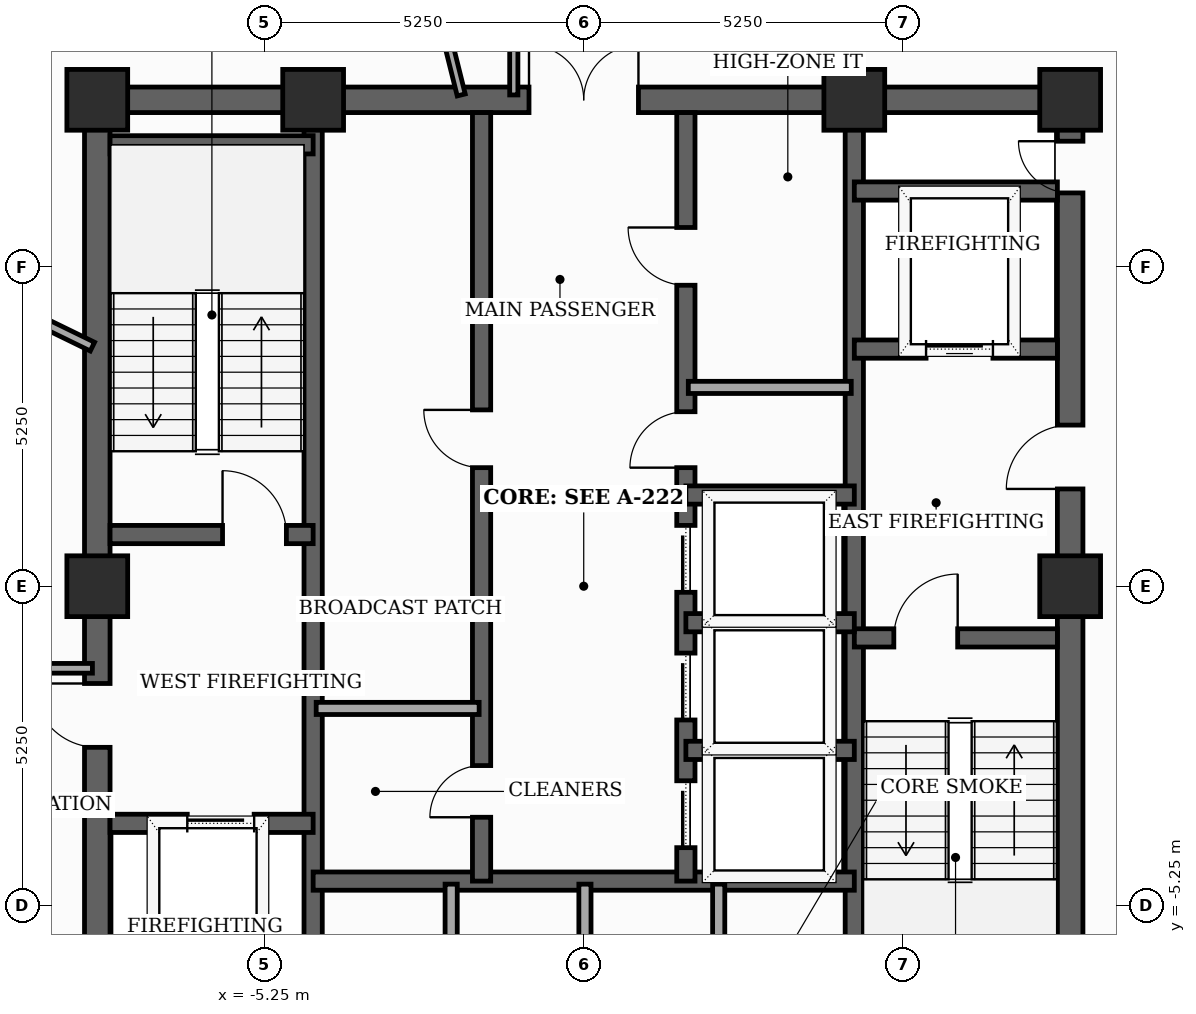
"""IFC4 building model, lengths in metres.
Left out: names, types, materials, properties, quantities, classifications, styles, units other than length and angle.
Written with IfcOpenShell. Run it as: python <this file> out.ifc"""

import sys

from ifc_helpers import new_model, si_unit, direction, frame, frame_2d, origin, origin_2d, place, context, subcontext, project, spatial, rectangle, extrude, element, fill, save


model = new_model("IFC4")
c1 = context("Model", 3, precision=1e-05, world=origin(), true_north=direction((0.0, 1.0)))
c2 = subcontext(c1, "Body", "Model", "MODEL_VIEW")
j1 = project(units=[si_unit("LENGTHUNIT", "METRE"), si_unit("PLANEANGLEUNIT", "RADIAN")], contexts=[c1])
p1 = place(None, origin())
s1 = spatial("IfcSite", under=j1, at=p1, CompositionType="ELEMENT")
p2 = place(p1, origin())
s2 = spatial("IfcBuilding", under=s1, at=p2, CompositionType="ELEMENT")
p3 = place(p2, frame((0.0, 0.0, 305.4)))
s3 = spatial("IfcBuildingStorey", under=s2, at=p3, CompositionType="ELEMENT", Elevation=305.4)
for number, where, z_axis, x_axis in (
    (1, (8.0, 0.0, 0.0), (0.0, 0.0, 1.0), (1.0, 0.0, 0.0)),
    (2, (8.0, 8.0, 0.0), (0.0, 0.0, 1.0), (1.0, 0.0, 0.0)),
    (3, (4.45, 8.0, 0.0), (0.0, 0.0, 1.0), (1.0, 0.0, 0.0)),
    (4, (-4.45, 8.0, 0.0), (0.0, 0.0, 1.0), (1.0, 0.0, 0.0)),
    (5, (-8.0, 8.0, 0.0), (0.0, 0.0, 1.0), (1.0, 0.0, 0.0)),
    (6, (-8.0, 0.0, 0.0), (0.0, 0.0, 1.0), (1.0, 0.0, 0.0)),
):
    element("IfcColumn", number, at=place(p3, frame(where, z_axis=z_axis, x_axis=x_axis)), inside=s3, PredefinedType="COLUMN", context=c2, shape_type="SweptSolid", body=[
        extrude(rectangle(XDim=1.0, YDim=1.0, at=origin_2d()), origin(), (0.0, 0.0, 1.0), 3.7),
    ])
p4 = place(p3, frame((-8.0, -8.0, 0.0), z_axis=(0.0, 0.0, 1.0), x_axis=(0.0, 1.0, 0.0)))
e7 = element("IfcWall", 7, at=p4, inside=s3, PredefinedType="SHEAR", context=c2, shape_type="SweptSolid", body=[
    extrude(rectangle(XDim=16.0, YDim=0.42, at=frame_2d((8.0, 0.0))), origin(), (0.0, 0.0, 1.0), 3.5),
])
p5 = place(p4, frame((0.681, 0.0, 0.0)))
e8 = element("IfcOpeningElement", 8, at=p5, cuts=e7, PredefinedType="OPENING", context=c2, shape_type="SweptSolid", body=[
    extrude(rectangle(XDim=0.85, YDim=2.02, at=frame_2d((0.425, 1.01))), frame((0.0, 0.22, 0.0), z_axis=(0.0, -1.0, 0.0), x_axis=(1.0, 0.0, 0.0)), (0.0, 0.0, 1.0), 0.44),
])
p6 = place(p4, frame((5.35, 0.0, 0.0)))
e9 = element("IfcOpeningElement", 9, at=p6, cuts=e7, PredefinedType="OPENING", context=c2, shape_type="SweptSolid", body=[
    extrude(rectangle(XDim=1.05, YDim=2.15, at=frame_2d((0.525, 1.075))), frame((0.0, 0.22, 0.0), z_axis=(0.0, -1.0, 0.0), x_axis=(1.0, 0.0, 0.0)), (0.0, 0.0, 1.0), 0.44),
])
p7 = place(p3, frame((8.0, -8.0, 0.0), z_axis=(0.0, 0.0, 1.0), x_axis=(0.0, 1.0, 0.0)))
e10 = element("IfcWall", 10, at=p7, inside=s3, PredefinedType="SHEAR", context=c2, shape_type="SweptSolid", body=[
    extrude(rectangle(XDim=16.0, YDim=0.42, at=frame_2d((8.0, 0.0))), origin(), (0.0, 0.0, 1.0), 3.5),
])
p8 = place(p7, frame((9.6, 0.0, 0.0)))
e11 = element("IfcOpeningElement", 11, at=p8, cuts=e10, PredefinedType="OPENING", context=c2, shape_type="SweptSolid", body=[
    extrude(rectangle(XDim=1.05, YDim=2.15, at=frame_2d((0.525, 1.075))), frame((0.0, 0.22, 0.0), z_axis=(0.0, -1.0, 0.0), x_axis=(1.0, 0.0, 0.0)), (0.0, 0.0, 1.0), 0.44),
])
p9 = place(p7, frame((14.469, 0.0, 0.0)))
e12 = element("IfcOpeningElement", 12, at=p9, cuts=e10, PredefinedType="OPENING", context=c2, shape_type="SweptSolid", body=[
    extrude(rectangle(XDim=0.85, YDim=2.02, at=frame_2d((0.425, 1.01))), frame((0.0, 0.22, 0.0), z_axis=(0.0, -1.0, 0.0), x_axis=(1.0, 0.0, 0.0)), (0.0, 0.0, 1.0), 0.44),
])
p10 = place(p3, frame((-8.0, 8.0, 0.0), z_axis=(0.0, 0.0, 1.0), x_axis=(1.0, 0.0, 0.0)))
e13 = element("IfcWall", 13, at=p10, inside=s3, PredefinedType="SHEAR", context=c2, shape_type="SweptSolid", body=[
    extrude(rectangle(XDim=16.0, YDim=0.42, at=frame_2d((8.0, 0.0))), origin(), (0.0, 0.0, 1.0), 3.5),
])
p11 = place(p10, frame((7.1, 0.0, 0.0)))
e14 = element("IfcOpeningElement", 14, at=p11, cuts=e13, PredefinedType="OPENING", context=c2, shape_type="SweptSolid", body=[
    extrude(rectangle(XDim=1.8, YDim=2.15, at=frame_2d((0.9, 1.075))), frame((0.0, 0.22, 0.0), z_axis=(0.0, -1.0, 0.0), x_axis=(1.0, 0.0, 0.0)), (0.0, 0.0, 1.0), 0.44),
])
for number, where, z_axis, x_axis in (
    (15, (-4.45, -7.79, 0.0), (0.0, 0.0, 1.0), (0.0, 1.0, 0.0)),
    (16, (4.45, -7.79, 0.0), (0.0, 0.0, 1.0), (0.0, 1.0, 0.0)),
):
    element("IfcWall", number, at=place(p3, frame(where, z_axis=z_axis, x_axis=x_axis)), inside=s3, PredefinedType="SHEAR", context=c2, shape_type="SweptSolid", body=[
        extrude(rectangle(XDim=15.58, YDim=0.3, at=frame_2d((7.79, 0.0))), origin(), (0.0, 0.0, 1.0), 3.5),
    ])
p12 = place(p3, frame((-7.79, 0.85, 0.0), z_axis=(0.0, 0.0, 1.0), x_axis=(1.0, 0.0, 0.0)))
e17 = element("IfcWall", 17, at=p12, inside=s3, PredefinedType="SHEAR", context=c2, shape_type="SweptSolid", body=[
    extrude(rectangle(XDim=3.34, YDim=0.3, at=frame_2d((1.67, 0.0))), origin(), (0.0, 0.0, 1.0), 3.5),
])
p13 = place(p12, frame((1.85, 0.0, 0.0)))
e18 = element("IfcOpeningElement", 18, at=p13, cuts=e17, PredefinedType="OPENING", context=c2, shape_type="SweptSolid", body=[
    extrude(rectangle(XDim=1.05, YDim=2.15, at=frame_2d((0.525, 1.075))), frame((0.0, 0.16, 0.0), z_axis=(0.0, -1.0, 0.0), x_axis=(1.0, 0.0, 0.0)), (0.0, 0.0, 1.0), 0.32),
])
p14 = place(p3, frame((-7.79, 7.26, 0.0), z_axis=(0.0, 0.0, 1.0), x_axis=(1.0, 0.0, 0.0)))
e19 = element("IfcWall", 19, at=p14, inside=s3, PredefinedType="SHEAR", context=c2, shape_type="SweptSolid", body=[
    extrude(rectangle(XDim=3.34, YDim=0.3, at=frame_2d((1.67, 0.0))), origin(), (0.0, 0.0, 1.0), 3.5),
])
p15 = place(p3, frame((4.45, -0.85, 0.0), z_axis=(0.0, 0.0, 1.0), x_axis=(1.0, 0.0, 0.0)))
e20 = element("IfcWall", 20, at=p15, inside=s3, PredefinedType="SHEAR", context=c2, shape_type="SweptSolid", body=[
    extrude(rectangle(XDim=3.34, YDim=0.3, at=frame_2d((1.67, 0.0))), origin(), (0.0, 0.0, 1.0), 3.5),
])
p16 = place(p15, frame((0.65, 0.0, 0.0)))
e21 = element("IfcOpeningElement", 21, at=p16, cuts=e20, PredefinedType="OPENING", context=c2, shape_type="SweptSolid", body=[
    extrude(rectangle(XDim=1.05, YDim=2.15, at=frame_2d((0.525, 1.075))), frame((0.0, 0.16, 0.0), z_axis=(0.0, -1.0, 0.0), x_axis=(1.0, 0.0, 0.0)), (0.0, 0.0, 1.0), 0.32),
])
p17 = place(p3, frame((-7.79, -3.9, 0.0), z_axis=(0.0, 0.0, 1.0), x_axis=(1.0, 0.0, 0.0)))
e22 = element("IfcWall", 22, at=p17, inside=s3, PredefinedType="SHEAR", context=c2, shape_type="SweptSolid", body=[
    extrude(rectangle(XDim=3.34, YDim=0.3, at=frame_2d((1.67, 0.0))), origin(), (0.0, 0.0, 1.0), 3.5),
])
p18 = place(p17, frame((1.27, 0.0, 0.0)))
e23 = element("IfcOpeningElement", 23, at=p18, cuts=e22, PredefinedType="OPENING", context=c2, shape_type="SweptSolid", body=[
    extrude(rectangle(XDim=1.1, YDim=2.1, at=frame_2d((0.55, 1.05))), frame((0.0, 0.16, 0.0), z_axis=(0.0, -1.0, 0.0), x_axis=(1.0, 0.0, 0.0)), (0.0, 0.0, 1.0), 0.32),
])
p19 = place(p3, frame((4.45, 3.9, 0.0), z_axis=(0.0, 0.0, 1.0), x_axis=(1.0, 0.0, 0.0)))
e24 = element("IfcWall", 24, at=p19, inside=s3, PredefinedType="SHEAR", context=c2, shape_type="SweptSolid", body=[
    extrude(rectangle(XDim=3.34, YDim=0.3, at=frame_2d((1.67, 0.0))), origin(), (0.0, 0.0, 1.0), 3.5),
])
p20 = place(p19, frame((1.18, 0.0, 0.0)))
e25 = element("IfcOpeningElement", 25, at=p20, cuts=e24, PredefinedType="OPENING", context=c2, shape_type="SweptSolid", body=[
    extrude(rectangle(XDim=1.1, YDim=2.1, at=frame_2d((0.55, 1.05))), frame((0.0, 0.16, 0.0), z_axis=(0.0, -1.0, 0.0), x_axis=(1.0, 0.0, 0.0)), (0.0, 0.0, 1.0), 0.32),
])
p21 = place(p3, frame((4.45, 6.5, 0.0), z_axis=(0.0, 0.0, 1.0), x_axis=(1.0, 0.0, 0.0)))
e26 = element("IfcWall", 26, at=p21, inside=s3, PredefinedType="SHEAR", context=c2, shape_type="SweptSolid", body=[
    extrude(rectangle(XDim=3.34, YDim=0.3, at=frame_2d((1.67, 0.0))), origin(), (0.0, 0.0, 1.0), 3.5),
])
p22 = place(p3, frame((-4.45, -4.85, 0.0), z_axis=(0.0, 0.0, 1.0), x_axis=(1.0, 0.0, 0.0)))
e27 = element("IfcWall", 27, at=p22, inside=s3, PredefinedType="SHEAR", context=c2, shape_type="SweptSolid", body=[
    extrude(rectangle(XDim=8.9, YDim=0.3, at=frame_2d((4.45, 0.0))), origin(), (0.0, 0.0, 1.0), 3.5),
])
p23 = place(p3, frame((-1.68, -4.85, 0.0), z_axis=(0.0, 0.0, 1.0), x_axis=(0.0, 1.0, 0.0)))
e28 = element("IfcWall", 28, at=p23, inside=s3, PredefinedType="SHEAR", context=c2, shape_type="SweptSolid", body=[
    extrude(rectangle(XDim=12.64, YDim=0.3, at=frame_2d((6.32, 0.0))), origin(), (0.0, 0.0, 1.0), 3.5),
])
p24 = place(p23, frame((1.05, 0.0, 0.0)))
e29 = element("IfcOpeningElement", 29, at=p24, cuts=e28, PredefinedType="OPENING", context=c2, shape_type="SweptSolid", body=[
    extrude(rectangle(XDim=0.85, YDim=2.02, at=frame_2d((0.425, 1.01))), frame((0.0, 0.16, 0.0), z_axis=(0.0, -1.0, 0.0), x_axis=(1.0, 0.0, 0.0)), (0.0, 0.0, 1.0), 0.32),
])
p25 = place(p23, frame((6.8, 0.0, 0.0)))
e30 = element("IfcOpeningElement", 30, at=p25, cuts=e28, PredefinedType="OPENING", context=c2, shape_type="SweptSolid", body=[
    extrude(rectangle(XDim=0.95, YDim=2.1, at=frame_2d((0.475, 1.05))), frame((0.0, 0.16, 0.0), z_axis=(0.0, -1.0, 0.0), x_axis=(1.0, 0.0, 0.0)), (0.0, 0.0, 1.0), 0.32),
])
p26 = place(p3, frame((1.68, -4.85, 0.0), z_axis=(0.0, 0.0, 1.0), x_axis=(0.0, 1.0, 0.0)))
e31 = element("IfcWall", 31, at=p26, inside=s3, PredefinedType="SHEAR", context=c2, shape_type="SweptSolid", body=[
    extrude(rectangle(XDim=12.64, YDim=0.3, at=frame_2d((6.32, 0.0))), origin(), (0.0, 0.0, 1.0), 3.5),
])
p27 = place(p26, frame((0.55, 0.0, 0.0)))
e32 = element("IfcOpeningElement", 32, at=p27, cuts=e31, PredefinedType="OPENING", context=c2, shape_type="SweptSolid", body=[
    extrude(rectangle(XDim=1.1, YDim=2.1, at=frame_2d((0.55, 1.05))), frame((0.0, 0.16, 0.0), z_axis=(0.0, -1.0, 0.0), x_axis=(1.0, 0.0, 0.0)), (0.0, 0.0, 1.0), 0.32),
])
p28 = place(p26, frame((2.65, 0.0, 0.0)))
e33 = element("IfcOpeningElement", 33, at=p28, cuts=e31, PredefinedType="OPENING", context=c2, shape_type="SweptSolid", body=[
    extrude(rectangle(XDim=1.1, YDim=2.1, at=frame_2d((0.55, 1.05))), frame((0.0, 0.16, 0.0), z_axis=(0.0, -1.0, 0.0), x_axis=(1.0, 0.0, 0.0)), (0.0, 0.0, 1.0), 0.32),
])
p29 = place(p26, frame((4.75, 0.0, 0.0)))
e34 = element("IfcOpeningElement", 34, at=p29, cuts=e31, PredefinedType="OPENING", context=c2, shape_type="SweptSolid", body=[
    extrude(rectangle(XDim=1.1, YDim=2.1, at=frame_2d((0.55, 1.05))), frame((0.0, 0.16, 0.0), z_axis=(0.0, -1.0, 0.0), x_axis=(1.0, 0.0, 0.0)), (0.0, 0.0, 1.0), 0.32),
])
p30 = place(p26, frame((6.8, 0.0, 0.0)))
e35 = element("IfcOpeningElement", 35, at=p30, cuts=e31, PredefinedType="OPENING", context=c2, shape_type="SweptSolid", body=[
    extrude(rectangle(XDim=0.92, YDim=2.1, at=frame_2d((0.46, 1.05))), frame((0.0, 0.16, 0.0), z_axis=(0.0, -1.0, 0.0), x_axis=(1.0, 0.0, 0.0)), (0.0, 0.0, 1.0), 0.32),
])
p31 = place(p26, frame((9.8, 0.0, 0.0)))
e36 = element("IfcOpeningElement", 36, at=p31, cuts=e31, PredefinedType="OPENING", context=c2, shape_type="SweptSolid", body=[
    extrude(rectangle(XDim=0.95, YDim=2.1, at=frame_2d((0.475, 1.05))), frame((0.0, 0.16, 0.0), z_axis=(0.0, -1.0, 0.0), x_axis=(1.0, 0.0, 0.0)), (0.0, 0.0, 1.0), 0.32),
])
for number, where, z_axis, x_axis in (
    (37, (1.68, 1.5, 0.0), (0.0, 0.0, 1.0), (1.0, 0.0, 0.0)),
    (38, (1.68, -2.7, 0.0), (0.0, 0.0, 1.0), (1.0, 0.0, 0.0)),
    (39, (1.68, -0.6, 0.0), (0.0, 0.0, 1.0), (1.0, 0.0, 0.0)),
):
    element("IfcWall", number, at=place(p3, frame(where, z_axis=z_axis, x_axis=x_axis)), inside=s3, PredefinedType="SHEAR", context=c2, shape_type="SweptSolid", body=[
        extrude(rectangle(XDim=2.77, YDim=0.3, at=frame_2d((1.385, 0.0))), origin(), (0.0, 0.0, 1.0), 3.5),
    ])
for number, where, z_axis, x_axis in (
    (40, (-2.18, -7.85, 0.0), (0.0, 0.0, 1.0), (0.0, 1.0, 0.0)),
    (41, (0.02, -7.85, 0.0), (0.0, 0.0, 1.0), (0.0, 1.0, 0.0)),
    (42, (2.22, -7.85, 0.0), (0.0, 0.0, 1.0), (0.0, 1.0, 0.0)),
):
    element("IfcWall", number, at=place(p3, frame(where, z_axis=z_axis, x_axis=x_axis)), inside=s3, PredefinedType="SOLIDWALL", context=c2, shape_type="SweptSolid", body=[
        extrude(rectangle(XDim=2.95, YDim=0.2, at=frame_2d((1.475, 0.0))), origin(), (0.0, 0.0, 1.0), 2.885),
    ])
for number, where, z_axis, x_axis in (
    (43, (-4.4, -2.01, 0.0), (0.0, 0.0, 1.0), (1.0, 0.0, 0.0)),
    (44, (1.72, 3.27, 0.0), (0.0, 0.0, 1.0), (1.0, 0.0, 0.0)),
):
    element("IfcWall", number, at=place(p3, frame(where, z_axis=z_axis, x_axis=x_axis)), inside=s3, PredefinedType="SOLIDWALL", context=c2, shape_type="SweptSolid", body=[
        extrude(rectangle(XDim=2.68, YDim=0.2, at=frame_2d((1.34, 0.0))), origin(), (0.0, 0.0, 1.0), 3.5),
    ])
p32 = place(p3, frame((-8.08, -1.35, 0.0), z_axis=(0.0, 0.0, 1.0), x_axis=(-1.0, 0.0, 0.0)))
e45 = element("IfcWall", 45, at=p32, inside=s3, PredefinedType="PARTITIONING", context=c2, shape_type="SweptSolid", body=[
    extrude(rectangle(XDim=2.57, YDim=0.16, at=frame_2d((1.285, 0.0))), origin(), (0.0, 0.0, 1.0), 2.885),
])
p33 = place(p3, frame((-1.15, 10.65, 0.0), z_axis=(0.0, 0.0, 1.0), x_axis=(0.0, -1.0, 0.0)))
e46 = element("IfcWall", 46, at=p33, inside=s3, PredefinedType="PARTITIONING", context=c2, shape_type="SweptSolid", body=[
    extrude(rectangle(XDim=2.57, YDim=0.135, at=frame_2d((1.285, 0.0))), origin(), (0.0, 0.0, 1.0), 2.885),
])
p34 = place(p3, frame((-8.08, 3.941, 0.0), z_axis=(0.0, 0.0, 1.0), x_axis=(-0.898780627628, 0.438398658074, 0.0)))
e47 = element("IfcWall", 47, at=p34, inside=s3, PredefinedType="PARTITIONING", context=c2, shape_type="SweptSolid", body=[
    extrude(rectangle(XDim=6.741, YDim=0.16, at=frame_2d((3.371, 0.0))), origin(), (0.0, 0.0, 1.0), 2.885),
])
p35 = place(p3, frame((-3.267, 13.104, 0.0), z_axis=(0.0, 0.0, 1.0), x_axis=(0.241825418424, -0.970319775643, 0.0)))
e48 = element("IfcWall", 48, at=p35, inside=s3, PredefinedType="PARTITIONING", context=c2, shape_type="SweptSolid", body=[
    extrude(rectangle(XDim=5.177, YDim=0.135, at=frame_2d((2.588, 0.0))), origin(), (0.0, 0.0, 1.0), 2.885),
])
p36 = place(p35, frame((2.129, 0.0, 0.0)))
e49 = element("IfcOpeningElement", 49, at=p36, cuts=e48, PredefinedType="OPENING", context=c2, shape_type="SweptSolid", body=[
    extrude(rectangle(XDim=0.92, YDim=2.1, at=frame_2d((0.46, 1.05))), frame((0.0, 0.077, 0.0), z_axis=(0.0, -1.0, 0.0), x_axis=(1.0, 0.0, 0.0)), (0.0, 0.0, 1.0), 0.155),
])
p37 = place(p6, origin())
e50 = element("IfcDoor", 50, at=p37, inside=s3, OperationType="SINGLE_SWING_RIGHT", PredefinedType="DOOR", context=c2, shape_type="SweptSolid", body=[
    extrude(rectangle(XDim=1.05, YDim=2.15, at=frame_2d((0.525, 1.075))), frame((0.0, 0.025, 0.0), z_axis=(0.0, -1.0, 0.0), x_axis=(1.0, 0.0, 0.0)), (0.0, 0.0, 1.0), 0.05),
])
fill(e9, e50)
p38 = place(p8, origin())
e51 = element("IfcDoor", 51, at=p38, inside=s3, OperationType="SINGLE_SWING_LEFT", PredefinedType="DOOR", context=c2, shape_type="SweptSolid", body=[
    extrude(rectangle(XDim=1.05, YDim=2.15, at=frame_2d((0.525, 1.075))), frame((0.0, 0.025, 0.0), z_axis=(0.0, -1.0, 0.0), x_axis=(1.0, 0.0, 0.0)), (0.0, 0.0, 1.0), 0.05),
])
fill(e11, e51)
p39 = place(p9, origin())
e52 = element("IfcDoor", 52, at=p39, inside=s3, OperationType="SINGLE_SWING_RIGHT", PredefinedType="TRAPDOOR", context=c2, shape_type="SweptSolid", body=[
    extrude(rectangle(XDim=0.85, YDim=2.02, at=frame_2d((0.425, 1.01))), frame((0.0, 0.025, 0.0), z_axis=(0.0, -1.0, 0.0), x_axis=(1.0, 0.0, 0.0)), (0.0, 0.0, 1.0), 0.05),
])
fill(e12, e52)
p40 = place(p11, origin())
e53 = element("IfcDoor", 53, at=p40, inside=s3, OperationType="DOUBLE_DOOR_SINGLE_SWING", PredefinedType="DOOR", context=c2, shape_type="SweptSolid", body=[
    extrude(rectangle(XDim=1.8, YDim=2.15, at=frame_2d((0.9, 1.075))), frame((0.0, 0.025, 0.0), z_axis=(0.0, -1.0, 0.0), x_axis=(1.0, 0.0, 0.0)), (0.0, 0.0, 1.0), 0.05),
])
fill(e14, e53)
p41 = place(p13, origin())
e54 = element("IfcDoor", 54, at=p41, inside=s3, OperationType="SINGLE_SWING_LEFT", PredefinedType="DOOR", context=c2, shape_type="SweptSolid", body=[
    extrude(rectangle(XDim=1.05, YDim=2.15, at=frame_2d((0.525, 1.075))), frame((0.0, 0.025, 0.0), z_axis=(0.0, -1.0, 0.0), x_axis=(1.0, 0.0, 0.0)), (0.0, 0.0, 1.0), 0.05),
])
fill(e18, e54)
p42 = place(p16, origin())
e55 = element("IfcDoor", 55, at=p42, inside=s3, OperationType="SINGLE_SWING_RIGHT", PredefinedType="DOOR", context=c2, shape_type="SweptSolid", body=[
    extrude(rectangle(XDim=1.05, YDim=2.15, at=frame_2d((0.525, 1.075))), frame((0.0, 0.025, 0.0), z_axis=(0.0, -1.0, 0.0), x_axis=(1.0, 0.0, 0.0)), (0.0, 0.0, 1.0), 0.05),
])
fill(e21, e55)
p43 = place(p18, origin())
e56 = element("IfcDoor", 56, at=p43, inside=s3, OperationType="SLIDING_TO_LEFT", PredefinedType="DOOR", context=c2, shape_type="SweptSolid", body=[
    extrude(rectangle(XDim=1.1, YDim=2.1, at=frame_2d((0.55, 1.05))), frame((0.0, 0.025, 0.0), z_axis=(0.0, -1.0, 0.0), x_axis=(1.0, 0.0, 0.0)), (0.0, 0.0, 1.0), 0.05),
])
fill(e23, e56)
p44 = place(p20, origin())
e57 = element("IfcDoor", 57, at=p44, inside=s3, OperationType="SLIDING_TO_LEFT", PredefinedType="DOOR", context=c2, shape_type="SweptSolid", body=[
    extrude(rectangle(XDim=1.1, YDim=2.1, at=frame_2d((0.55, 1.05))), frame((0.0, 0.025, 0.0), z_axis=(0.0, -1.0, 0.0), x_axis=(1.0, 0.0, 0.0)), (0.0, 0.0, 1.0), 0.05),
])
fill(e25, e57)
p45 = place(p24, origin())
e58 = element("IfcDoor", 58, at=p45, inside=s3, OperationType="SINGLE_SWING_LEFT", PredefinedType="TRAPDOOR", context=c2, shape_type="SweptSolid", body=[
    extrude(rectangle(XDim=0.85, YDim=2.02, at=frame_2d((0.425, 1.01))), frame((0.0, 0.025, 0.0), z_axis=(0.0, -1.0, 0.0), x_axis=(1.0, 0.0, 0.0)), (0.0, 0.0, 1.0), 0.05),
])
fill(e29, e58)
p46 = place(p25, origin())
e59 = element("IfcDoor", 59, at=p46, inside=s3, OperationType="SINGLE_SWING_RIGHT", PredefinedType="DOOR", context=c2, shape_type="SweptSolid", body=[
    extrude(rectangle(XDim=0.95, YDim=2.1, at=frame_2d((0.475, 1.05))), frame((0.0, 0.025, 0.0), z_axis=(0.0, -1.0, 0.0), x_axis=(1.0, 0.0, 0.0)), (0.0, 0.0, 1.0), 0.05),
])
fill(e30, e59)
p47 = place(p27, origin())
e60 = element("IfcDoor", 60, at=p47, inside=s3, OperationType="SLIDING_TO_LEFT", PredefinedType="DOOR", context=c2, shape_type="SweptSolid", body=[
    extrude(rectangle(XDim=1.1, YDim=2.1, at=frame_2d((0.55, 1.05))), frame((0.0, 0.025, 0.0), z_axis=(0.0, -1.0, 0.0), x_axis=(1.0, 0.0, 0.0)), (0.0, 0.0, 1.0), 0.05),
])
fill(e32, e60)
p48 = place(p28, origin())
e61 = element("IfcDoor", 61, at=p48, inside=s3, OperationType="SLIDING_TO_LEFT", PredefinedType="DOOR", context=c2, shape_type="SweptSolid", body=[
    extrude(rectangle(XDim=1.1, YDim=2.1, at=frame_2d((0.55, 1.05))), frame((0.0, 0.025, 0.0), z_axis=(0.0, -1.0, 0.0), x_axis=(1.0, 0.0, 0.0)), (0.0, 0.0, 1.0), 0.05),
])
fill(e33, e61)
p49 = place(p29, origin())
e62 = element("IfcDoor", 62, at=p49, inside=s3, OperationType="SLIDING_TO_LEFT", PredefinedType="DOOR", context=c2, shape_type="SweptSolid", body=[
    extrude(rectangle(XDim=1.1, YDim=2.1, at=frame_2d((0.55, 1.05))), frame((0.0, 0.025, 0.0), z_axis=(0.0, -1.0, 0.0), x_axis=(1.0, 0.0, 0.0)), (0.0, 0.0, 1.0), 0.05),
])
fill(e34, e62)
p50 = place(p30, origin())
e63 = element("IfcDoor", 63, at=p50, inside=s3, OperationType="SINGLE_SWING_LEFT", PredefinedType="DOOR", context=c2, shape_type="SweptSolid", body=[
    extrude(rectangle(XDim=0.92, YDim=2.1, at=frame_2d((0.46, 1.05))), frame((0.0, 0.025, 0.0), z_axis=(0.0, -1.0, 0.0), x_axis=(1.0, 0.0, 0.0)), (0.0, 0.0, 1.0), 0.05),
])
fill(e35, e63)
p51 = place(p31, origin())
e64 = element("IfcDoor", 64, at=p51, inside=s3, OperationType="SINGLE_SWING_RIGHT", PredefinedType="DOOR", context=c2, shape_type="SweptSolid", body=[
    extrude(rectangle(XDim=0.95, YDim=2.1, at=frame_2d((0.475, 1.05))), frame((0.0, 0.025, 0.0), z_axis=(0.0, -1.0, 0.0), x_axis=(1.0, 0.0, 0.0)), (0.0, 0.0, 1.0), 0.05),
])
fill(e36, e64)
save(model, sys.argv[1])
